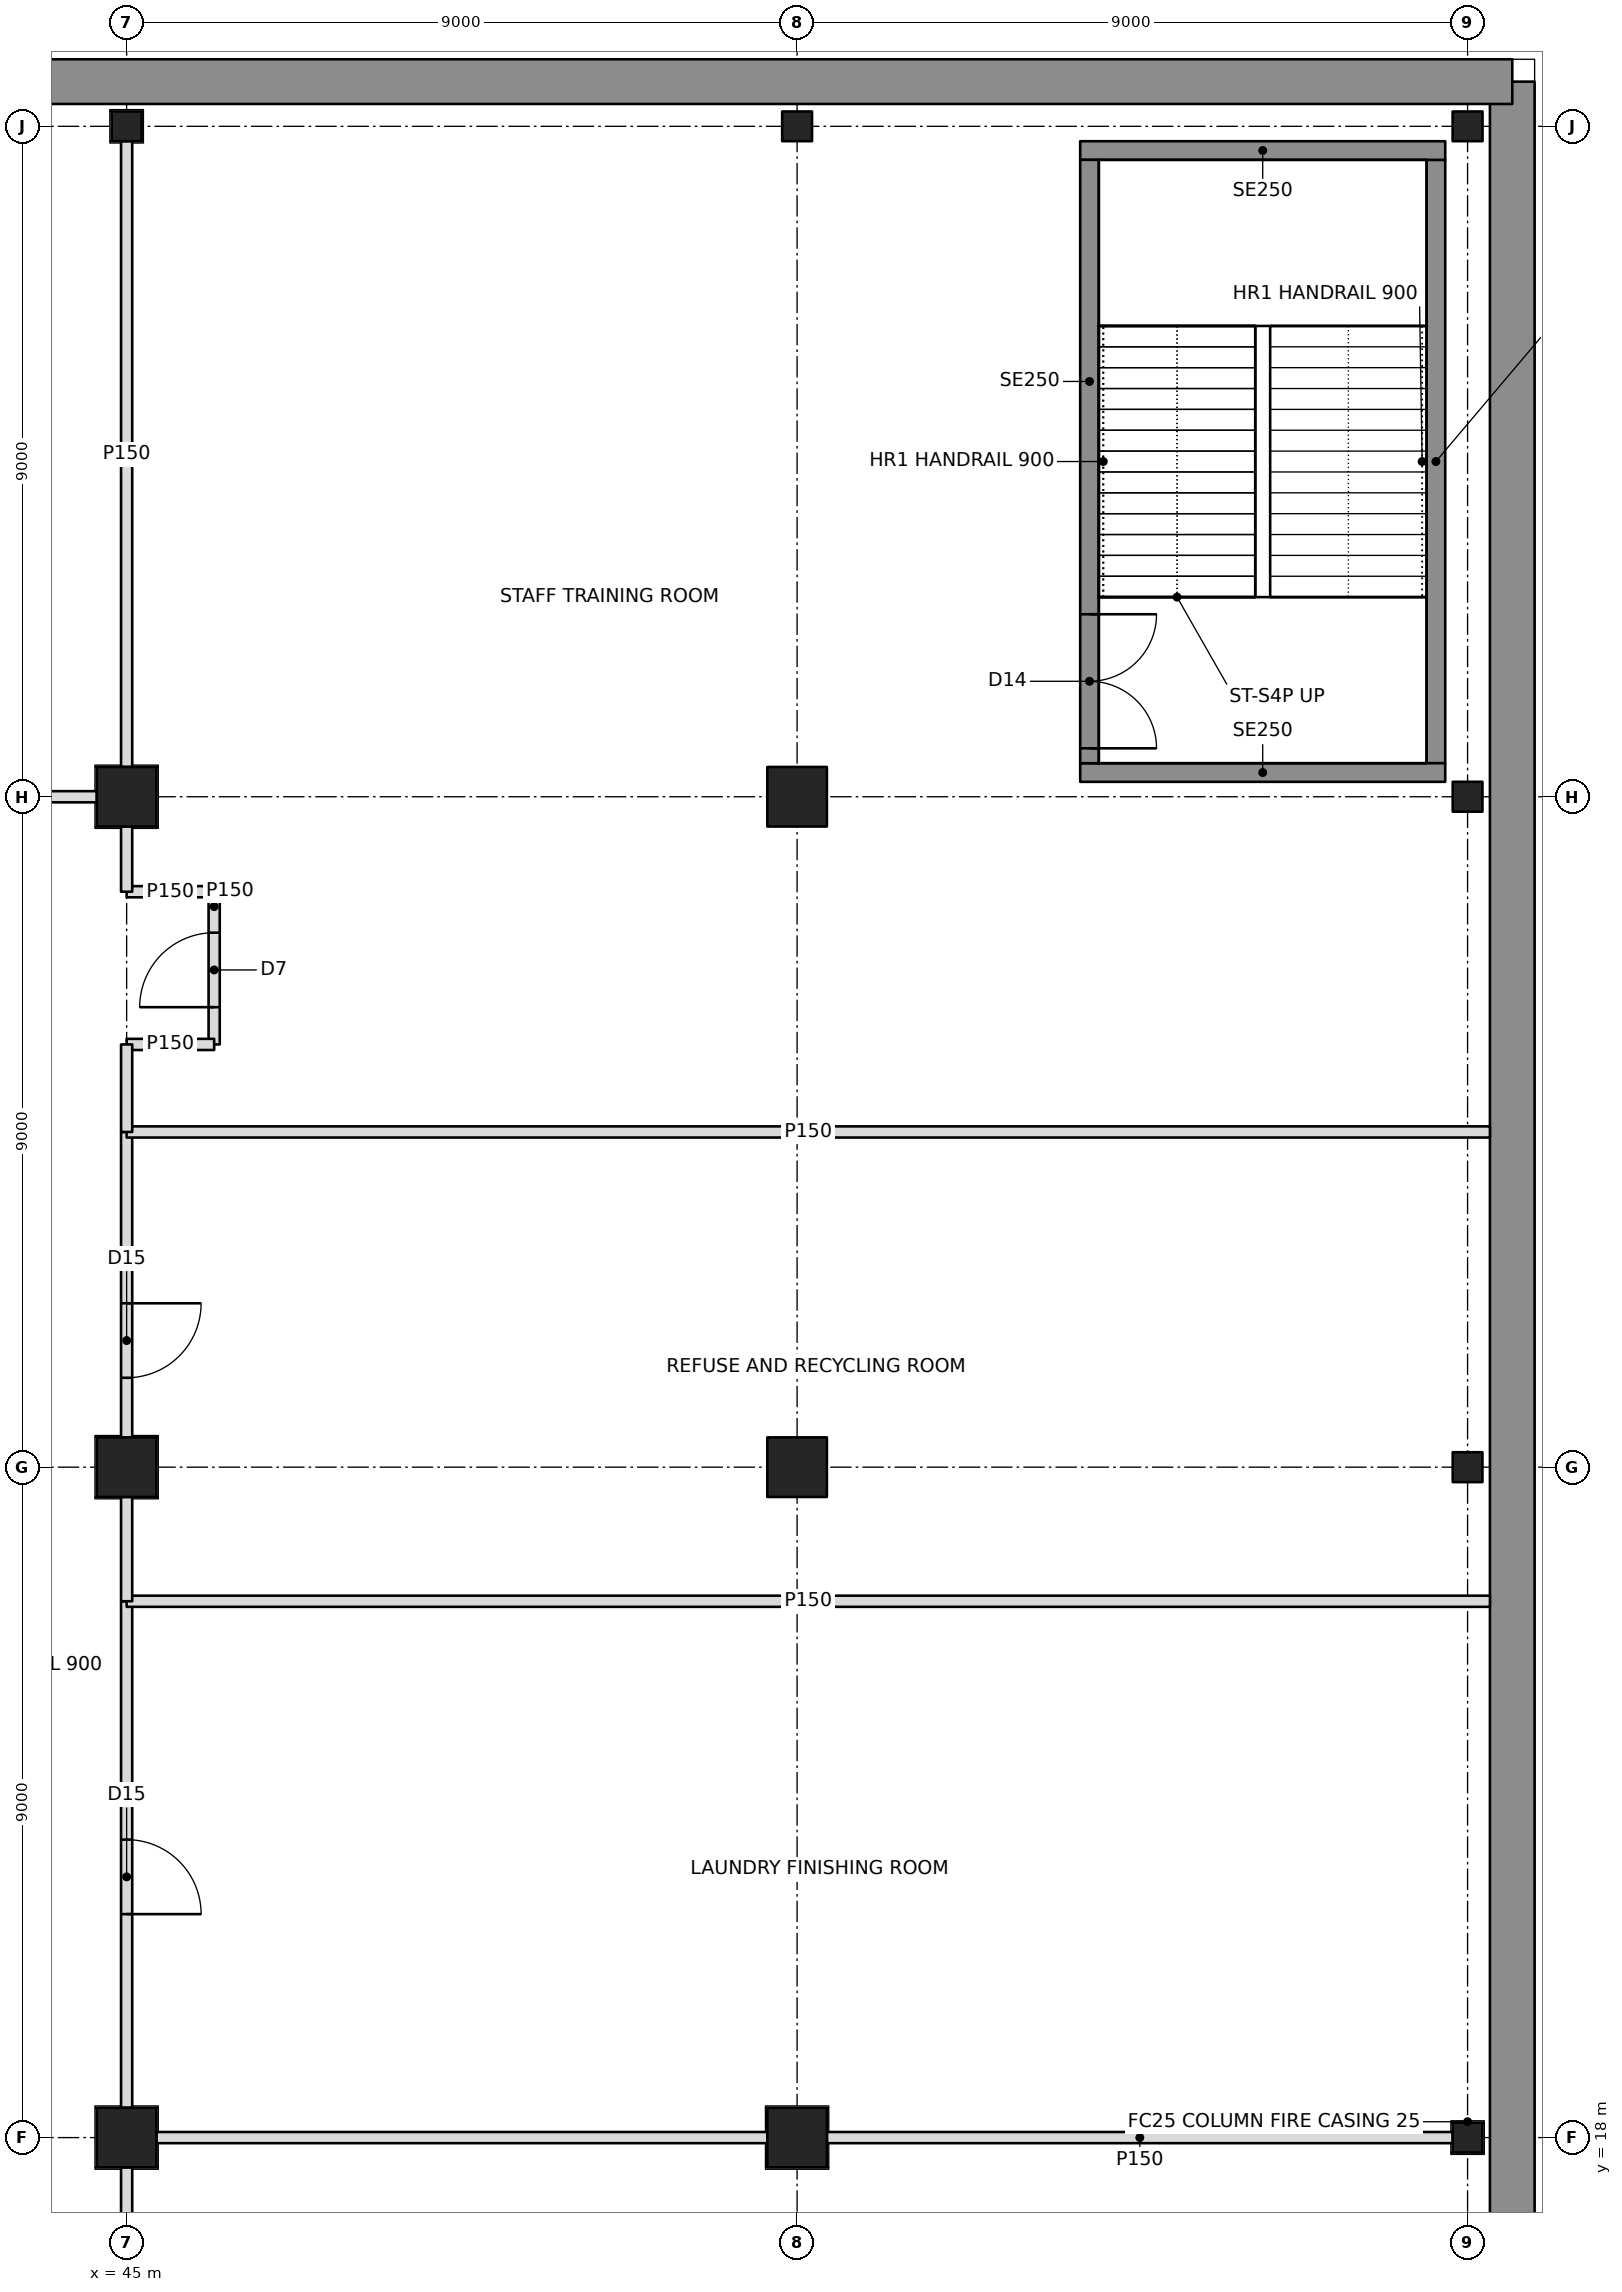
"""IFC4 building model, lengths in metres.
Left out: names, types, materials, properties, quantities, classifications, styles, units other than length and angle.
Written with IfcOpenShell. Run it as: python <this file> out.ifc"""

import sys

from ifc_helpers import new_model, si_unit, direction, frame, frame_2d, origin, origin_2d, place, context, subcontext, project, spatial, rectangle, hollow_rectangle, i_section, extrude, element, fill, save


model = new_model("IFC4")
c1 = context("Model", 3, precision=1e-05, world=origin(), true_north=direction((0.0, 1.0)))
c2 = subcontext(c1, "Body", "Model", "MODEL_VIEW")
j1 = project(units=[si_unit("LENGTHUNIT", "METRE"), si_unit("PLANEANGLEUNIT", "RADIAN")], contexts=[c1])
p1 = place(None, origin())
s1 = spatial("IfcSite", under=j1, at=p1, CompositionType="ELEMENT")
p2 = place(p1, origin())
s2 = spatial("IfcBuilding", under=s1, at=p2, CompositionType="ELEMENT")
p3 = place(p2, frame((0.0, 0.0, -10.5)))
s3 = spatial("IfcBuildingStorey", under=s2, at=p3, CompositionType="ELEMENT", Elevation=-10.5)
for number, where, z_axis, x_axis in (
    (1, (45.0, 18.0, -0.5), (0.0, 0.0, 1.0), (0.0, 1.0, 0.0)),
    (2, (45.0, 27.0, -0.5), (0.0, 0.0, 1.0), (0.0, 1.0, 0.0)),
    (3, (45.0, 36.0, -0.5), (0.0, 0.0, 1.0), (1.0, 0.0, 0.0)),
):
    element("IfcColumn", number, at=place(p3, frame(where, z_axis=z_axis, x_axis=x_axis)), inside=s3, PredefinedType="COLUMN", context=c2, shape_type="SweptSolid", body=[
        extrude(hollow_rectangle(XDim=0.8, YDim=0.8, WallThickness=0.1, at=origin_2d()), origin(), (0.0, 0.0, 1.0), 5.5),
    ])
p4 = place(p3, frame((45.0, 45.0, -0.5), z_axis=(0.0, 0.0, 1.0), x_axis=(1.0, 0.0, 0.0)))
e4 = element("IfcColumn", 4, at=p4, inside=s3, PredefinedType="COLUMN", context=c2, shape_type="SweptSolid", body=[
    extrude(i_section(OverallWidth=0.401, OverallDepth=0.399, WebThickness=0.025, FlangeThickness=0.04, at=origin_2d()), origin(), (0.0, 0.0, 1.0), 5.5),
])
for number, where, z_axis, x_axis in (
    (5, (54.0, 18.0, -0.5), (0.0, 0.0, 1.0), (0.0, 1.0, 0.0)),
    (6, (54.0, 27.0, -0.5), (0.0, 0.0, 1.0), (0.0, 1.0, 0.0)),
    (7, (54.0, 36.0, -0.5), (0.0, 0.0, 1.0), (1.0, 0.0, 0.0)),
):
    element("IfcColumn", number, at=place(p3, frame(where, z_axis=z_axis, x_axis=x_axis)), inside=s3, PredefinedType="COLUMN", context=c2, shape_type="SweptSolid", body=[
        extrude(hollow_rectangle(XDim=0.8, YDim=0.8, WallThickness=0.1, at=origin_2d()), origin(), (0.0, 0.0, 1.0), 5.5),
    ])
for number, where, z_axis, x_axis in (
    (8, (54.0, 45.0, -0.5), (0.0, 0.0, 1.0), (1.0, 0.0, 0.0)),
    (9, (63.0, 18.0, -0.5), (0.0, 0.0, 1.0), (0.0, 1.0, 0.0)),
    (10, (63.0, 27.0, -0.5), (0.0, 0.0, 1.0), (0.0, 1.0, 0.0)),
    (11, (63.0, 36.0, -0.5), (0.0, 0.0, 1.0), (0.0, 1.0, 0.0)),
    (12, (63.0, 45.0, -0.5), (0.0, 0.0, 1.0), (1.0, 0.0, 0.0)),
):
    element("IfcColumn", number, at=place(p3, frame(where, z_axis=z_axis, x_axis=x_axis)), inside=s3, PredefinedType="COLUMN", context=c2, shape_type="SweptSolid", body=[
        extrude(i_section(OverallWidth=0.401, OverallDepth=0.399, WebThickness=0.025, FlangeThickness=0.04, at=origin_2d()), origin(), (0.0, 0.0, 1.0), 5.5),
    ])
for number, where, z_axis, x_axis in (
    (13, (63.6, -27.6, 0.0), (0.0, 0.0, 1.0), (0.0, 1.0, 0.0)),
    (14, (63.6, 45.6, 0.0), (0.0, 0.0, 1.0), (-1.0, 0.0, 0.0)),
):
    element("IfcWall", number, at=place(p3, frame(where, z_axis=z_axis, x_axis=x_axis)), inside=s3, PredefinedType="SOLIDWALL", context=c2, shape_type="SweptSolid", body=[
        extrude(rectangle(XDim=73.2, YDim=0.6, at=frame_2d((36.6, 0.0))), origin(), (0.0, 0.0, 1.0), 4.7),
    ])
p5 = place(p3, frame((44.6, 36.0, 0.0), z_axis=(0.0, 0.0, 1.0), x_axis=(-1.0, 0.0, 0.0)))
e15 = element("IfcWall", 15, at=p5, inside=s3, PredefinedType="PARTITIONING", context=c2, shape_type="SweptSolid", body=[
    extrude(rectangle(XDim=2.7, YDim=0.15, at=frame_2d((1.35, 0.0))), origin(), (0.0, 0.0, 1.0), 3.842),
])
p6 = place(p3, frame((45.0, 9.4, 0.0), z_axis=(0.0, 0.0, 1.0), x_axis=(0.0, 1.0, 0.0)))
e16 = element("IfcWall", 16, at=p6, inside=s3, PredefinedType="PARTITIONING", context=c2, shape_type="SweptSolid", body=[
    extrude(rectangle(XDim=8.2, YDim=0.15, at=frame_2d((4.1, 0.0))), origin(), (0.0, 0.0, 1.0), 3.842),
])
p7 = place(p6, frame((3.6, 0.0, 0.0)))
e17 = element("IfcOpeningElement", 17, at=p7, cuts=e16, PredefinedType="OPENING", context=c2, shape_type="SweptSolid", body=[
    extrude(rectangle(XDim=1.0, YDim=2.1, at=frame_2d((0.5, 1.05))), frame((0.0, 0.085, 0.0), z_axis=(0.0, -1.0, 0.0), x_axis=(1.0, 0.0, 0.0)), (0.0, 0.0, 1.0), 0.17),
])
p8 = place(p3, frame((45.4, 18.0, 0.0), z_axis=(0.0, 0.0, 1.0), x_axis=(1.0, 0.0, 0.0)))
e18 = element("IfcWall", 18, at=p8, inside=s3, PredefinedType="PARTITIONING", context=c2, shape_type="SweptSolid", body=[
    extrude(rectangle(XDim=8.2, YDim=0.15, at=frame_2d((4.1, 0.0))), origin(), (0.0, 0.0, 1.0), 3.842),
])
p9 = place(p3, frame((54.4, 18.0, 0.0), z_axis=(0.0, 0.0, 1.0), x_axis=(1.0, 0.0, 0.0)))
e19 = element("IfcWall", 19, at=p9, inside=s3, PredefinedType="PARTITIONING", context=c2, shape_type="SweptSolid", body=[
    extrude(rectangle(XDim=8.401, YDim=0.15, at=frame_2d((4.2, 0.0))), origin(), (0.0, 0.0, 1.0), 3.842),
])
p10 = place(p3, frame((45.0, 18.4, 0.0), z_axis=(0.0, 0.0, 1.0), x_axis=(0.0, 1.0, 0.0)))
e20 = element("IfcWall", 20, at=p10, inside=s3, PredefinedType="PARTITIONING", context=c2, shape_type="SweptSolid", body=[
    extrude(rectangle(XDim=6.8, YDim=0.15, at=frame_2d((3.4, 0.0))), origin(), (0.0, 0.0, 1.0), 3.842),
])
p11 = place(p10, frame((2.6, 0.0, 0.0)))
e21 = element("IfcOpeningElement", 21, at=p11, cuts=e20, PredefinedType="OPENING", context=c2, shape_type="SweptSolid", body=[
    extrude(rectangle(XDim=1.0, YDim=2.1, at=frame_2d((0.5, 1.05))), frame((0.0, 0.085, 0.0), z_axis=(0.0, -1.0, 0.0), x_axis=(1.0, 0.0, 0.0)), (0.0, 0.0, 1.0), 0.17),
])
p12 = place(p3, frame((63.3, 25.2, 0.0), z_axis=(0.0, 0.0, 1.0), x_axis=(-1.0, 0.0, 0.0)))
e22 = element("IfcWall", 22, at=p12, inside=s3, PredefinedType="PARTITIONING", context=c2, shape_type="SweptSolid", body=[
    extrude(rectangle(XDim=18.3, YDim=0.15, at=frame_2d((9.15, 0.0))), origin(), (0.0, 0.0, 1.0), 3.841),
])
p13 = place(p3, frame((45.0, 25.2, 0.0), z_axis=(0.0, 0.0, 1.0), x_axis=(0.0, 1.0, 0.0)))
e23 = element("IfcWall", 23, at=p13, inside=s3, PredefinedType="PARTITIONING", context=c2, shape_type="SweptSolid", body=[
    extrude(rectangle(XDim=1.4, YDim=0.15, at=frame_2d((0.7, 0.0))), origin(), (0.0, 0.0, 1.0), 3.842),
])
p14 = place(p3, frame((45.0, 27.4, 0.0), z_axis=(0.0, 0.0, 1.0), x_axis=(0.0, 1.0, 0.0)))
e24 = element("IfcWall", 24, at=p14, inside=s3, PredefinedType="PARTITIONING", context=c2, shape_type="SweptSolid", body=[
    extrude(rectangle(XDim=4.1, YDim=0.15, at=frame_2d((2.05, 0.0))), origin(), (0.0, 0.0, 1.0), 3.842),
])
p15 = place(p14, frame((0.8, 0.0, 0.0)))
e25 = element("IfcOpeningElement", 25, at=p15, cuts=e24, PredefinedType="OPENING", context=c2, shape_type="SweptSolid", body=[
    extrude(rectangle(XDim=1.0, YDim=2.1, at=frame_2d((0.5, 1.05))), frame((0.0, 0.085, 0.0), z_axis=(0.0, -1.0, 0.0), x_axis=(1.0, 0.0, 0.0)), (0.0, 0.0, 1.0), 0.17),
])
p16 = place(p3, frame((45.0, 31.5, 0.0), z_axis=(0.0, 0.0, 1.0), x_axis=(1.0, 0.0, 0.0)))
e26 = element("IfcWall", 26, at=p16, inside=s3, PredefinedType="PARTITIONING", context=c2, shape_type="SweptSolid", body=[
    extrude(rectangle(XDim=18.3, YDim=0.15, at=frame_2d((9.15, 0.0))), origin(), (0.0, 0.0, 1.0), 3.841),
])
p17 = place(p3, frame((45.0, 31.5, 0.0), z_axis=(0.0, 0.0, 1.0), x_axis=(0.0, 1.0, 0.0)))
e27 = element("IfcWall", 27, at=p17, inside=s3, PredefinedType="PARTITIONING", context=c2, shape_type="SweptSolid", body=[
    extrude(rectangle(XDim=1.175, YDim=0.15, at=frame_2d((0.587, 0.0))), origin(), (0.0, 0.0, 1.0), 3.842),
])
p18 = place(p3, frame((45.0, 36.4, 0.0), z_axis=(0.0, 0.0, 1.0), x_axis=(0.0, 1.0, 0.0)))
e28 = element("IfcWall", 28, at=p18, inside=s3, PredefinedType="PARTITIONING", context=c2, shape_type="SweptSolid", body=[
    extrude(rectangle(XDim=8.401, YDim=0.15, at=frame_2d((4.2, 0.0))), origin(), (0.0, 0.0, 1.0), 3.842),
])
p19 = place(p3, frame((45.0, 34.725, 0.0), z_axis=(0.0, 0.0, 1.0), x_axis=(0.0, 1.0, 0.0)))
e29 = element("IfcWall", 29, at=p19, inside=s3, PredefinedType="PARTITIONING", context=c2, shape_type="SweptSolid", body=[
    extrude(rectangle(XDim=0.875, YDim=0.15, at=frame_2d((0.438, 0.0))), origin(), (0.0, 0.0, 1.0), 3.842),
])
for number, where, z_axis, x_axis in (
    (30, (45.0, 32.675, 0.0), (0.0, 0.0, 1.0), (1.0, 0.0, 0.0)),
    (31, (45.0, 34.725, 0.0), (0.0, 0.0, 1.0), (1.0, 0.0, 0.0)),
):
    element("IfcWall", number, at=place(p3, frame(where, z_axis=z_axis, x_axis=x_axis)), inside=s3, PredefinedType="PARTITIONING", context=c2, shape_type="SweptSolid", body=[
        extrude(rectangle(XDim=1.175, YDim=0.15, at=frame_2d((0.587, 0.0))), origin(), (0.0, 0.0, 1.0), 3.841),
    ])
p20 = place(p3, frame((46.175, 32.675, 0.0), z_axis=(0.0, 0.0, 1.0), x_axis=(0.0, 1.0, 0.0)))
e32 = element("IfcWall", 32, at=p20, inside=s3, PredefinedType="PARTITIONING", context=c2, shape_type="SweptSolid", body=[
    extrude(rectangle(XDim=2.05, YDim=0.15, at=frame_2d((1.025, 0.0))), origin(), (0.0, 0.0, 1.0), 4.7),
])
p21 = place(p20, frame((0.5, 0.0, 0.0)))
e33 = element("IfcOpeningElement", 33, at=p21, cuts=e32, PredefinedType="OPENING", context=c2, shape_type="SweptSolid", body=[
    extrude(rectangle(XDim=1.0, YDim=2.1, at=frame_2d((0.5, 1.05))), frame((0.0, 0.085, 0.0), z_axis=(0.0, -1.0, 0.0), x_axis=(1.0, 0.0, 0.0)), (0.0, 0.0, 1.0), 0.17),
])
for number, where, z_axis, x_axis in (
    (34, (57.8, 36.325, 0.0), (0.0, 0.0, 1.0), (1.0, 0.0, 0.0)),
    (35, (57.8, 44.675, 0.0), (0.0, 0.0, 1.0), (1.0, 0.0, 0.0)),
):
    element("IfcWall", number, at=place(p3, frame(where, z_axis=z_axis, x_axis=x_axis)), inside=s3, PredefinedType="SOLIDWALL", context=c2, shape_type="SweptSolid", body=[
        extrude(rectangle(XDim=4.9, YDim=0.25, at=frame_2d((2.45, 0.0))), origin(), (0.0, 0.0, 1.0), 4.7),
    ])
p22 = place(p3, frame((57.925, 36.45, 0.0), z_axis=(0.0, 0.0, 1.0), x_axis=(0.0, 1.0, 0.0)))
e36 = element("IfcWall", 36, at=p22, inside=s3, PredefinedType="SOLIDWALL", context=c2, shape_type="SweptSolid", body=[
    extrude(rectangle(XDim=8.1, YDim=0.25, at=frame_2d((4.05, 0.0))), origin(), (0.0, 0.0, 1.0), 4.7),
])
p23 = place(p22, frame((0.2, 0.0, 0.0)))
e37 = element("IfcOpeningElement", 37, at=p23, cuts=e36, PredefinedType="OPENING", context=c2, shape_type="SweptSolid", body=[
    extrude(rectangle(XDim=1.8, YDim=2.1, at=frame_2d((0.9, 1.05))), frame((0.0, 0.135, 0.0), z_axis=(0.0, -1.0, 0.0), x_axis=(1.0, 0.0, 0.0)), (0.0, 0.0, 1.0), 0.27),
])
p24 = place(p3, frame((62.575, 36.45, 0.0), z_axis=(0.0, 0.0, 1.0), x_axis=(0.0, 1.0, 0.0)))
e38 = element("IfcWall", 38, at=p24, inside=s3, PredefinedType="SOLIDWALL", context=c2, shape_type="SweptSolid", body=[
    extrude(rectangle(XDim=8.1, YDim=0.25, at=frame_2d((4.05, 0.0))), origin(), (0.0, 0.0, 1.0), 4.7),
])
p25 = place(p15, frame((1.0, 0.0, 0.0), z_axis=(0.0, 0.0, 1.0), x_axis=(-1.0, 0.0, 0.0)))
e39 = element("IfcDoor", 39, at=p25, inside=s3, OperationType="SINGLE_SWING_LEFT", PredefinedType="DOOR", context=c2, shape_type="SweptSolid", body=[
    extrude(rectangle(XDim=1.0, YDim=2.1, at=frame_2d((0.5, 1.05))), frame((0.0, 0.025, 0.0), z_axis=(0.0, -1.0, 0.0), x_axis=(1.0, 0.0, 0.0)), (0.0, 0.0, 1.0), 0.05),
])
fill(e25, e39)
p26 = place(p11, frame((1.0, 0.0, 0.0), z_axis=(0.0, 0.0, 1.0), x_axis=(-1.0, 0.0, 0.0)))
e40 = element("IfcDoor", 40, at=p26, inside=s3, OperationType="SINGLE_SWING_RIGHT", PredefinedType="DOOR", context=c2, shape_type="SweptSolid", body=[
    extrude(rectangle(XDim=1.0, YDim=2.1, at=frame_2d((0.5, 1.05))), frame((0.0, 0.025, 0.0), z_axis=(0.0, -1.0, 0.0), x_axis=(1.0, 0.0, 0.0)), (0.0, 0.0, 1.0), 0.05),
])
fill(e21, e40)
p27 = place(p21, origin())
e41 = element("IfcDoor", 41, at=p27, inside=s3, OperationType="SINGLE_SWING_LEFT", PredefinedType="DOOR", context=c2, shape_type="SweptSolid", body=[
    extrude(rectangle(XDim=1.0, YDim=2.1, at=frame_2d((0.5, 1.05))), frame((0.0, 0.025, 0.0), z_axis=(0.0, -1.0, 0.0), x_axis=(1.0, 0.0, 0.0)), (0.0, 0.0, 1.0), 0.05),
])
fill(e33, e41)
p28 = place(p23, frame((1.8, 0.0, 0.0), z_axis=(0.0, 0.0, 1.0), x_axis=(-1.0, 0.0, 0.0)))
e42 = element("IfcDoor", 42, at=p28, inside=s3, OperationType="DOUBLE_DOOR_SINGLE_SWING", PredefinedType="DOOR", context=c2, shape_type="SweptSolid", body=[
    extrude(rectangle(XDim=1.8, YDim=2.1, at=frame_2d((0.9, 1.05))), frame((0.0, 0.025, 0.0), z_axis=(0.0, -1.0, 0.0), x_axis=(1.0, 0.0, 0.0)), (0.0, 0.0, 1.0), 0.05),
])
fill(e37, e42)
save(model, sys.argv[1])
